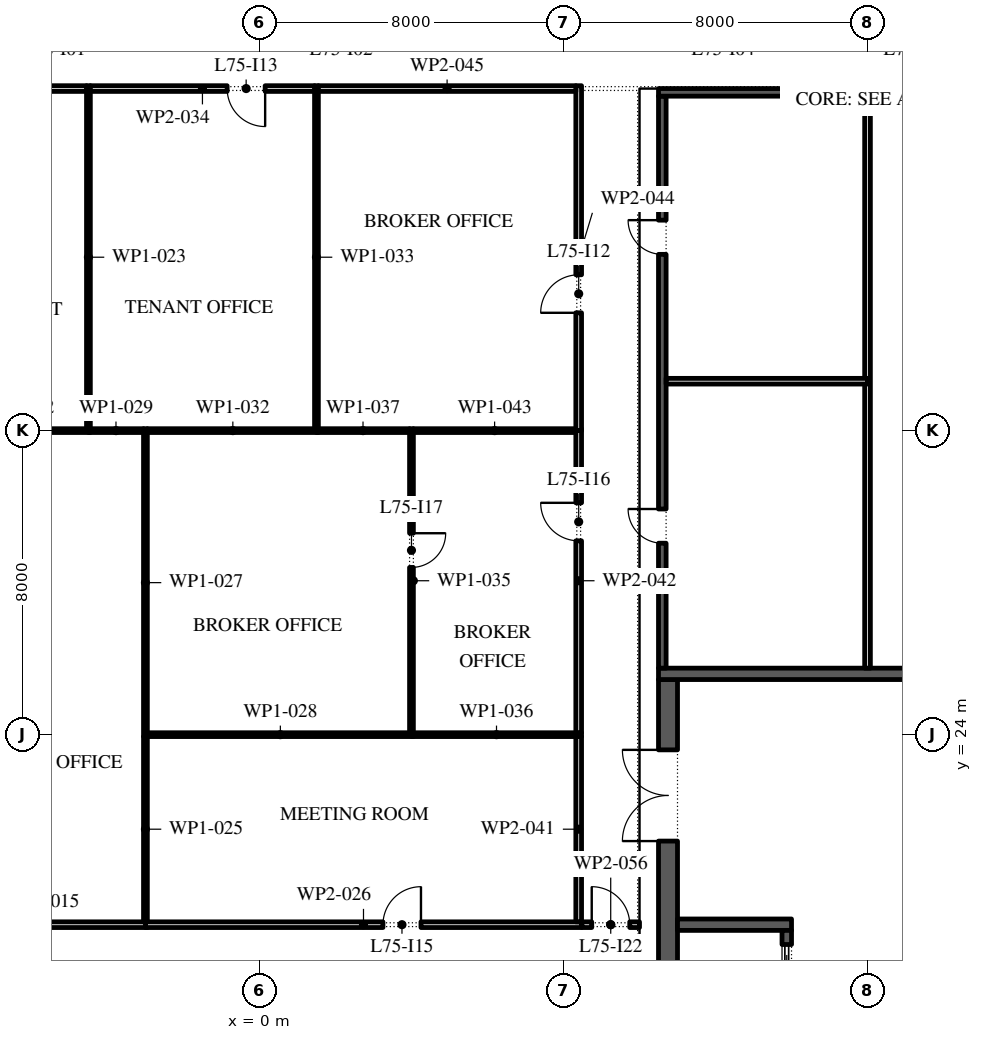
"""IFC4 building model, lengths in metres.
Left out: names, types, materials, properties, quantities, classifications, styles, units other than length and angle.
Written with IfcOpenShell. Run it as: python <this file> out.ifc"""

import sys

from ifc_helpers import new_model, si_unit, direction, frame, frame_2d, origin, place, context, subcontext, project, spatial, rectangle, extrude, element, fill, save


model = new_model("IFC4")
c1 = context("Model", 3, precision=1e-05, world=origin(), true_north=direction((0.0, 1.0)))
c2 = subcontext(c1, "Body", "Model", "MODEL_VIEW")
j1 = project(units=[si_unit("LENGTHUNIT", "METRE"), si_unit("PLANEANGLEUNIT", "RADIAN")], contexts=[c1])
p1 = place(None, origin())
s1 = spatial("IfcSite", under=j1, at=p1, CompositionType="ELEMENT")
p2 = place(p1, origin())
s2 = spatial("IfcBuilding", under=s1, at=p2, CompositionType="ELEMENT")
p3 = place(p2, frame((0.0, 0.0, 342.6)))
s3 = spatial("IfcBuildingStorey", under=s2, at=p3, CompositionType="ELEMENT", Elevation=342.6)
p4 = place(p3, frame((10.75, -2.45, 0.0), z_axis=(0.0, 0.0, 1.0), x_axis=(0.0, 1.0, 0.0)))
e1 = element("IfcWall", 1, at=p4, inside=s3, PredefinedType="SHEAR", context=c2, shape_type="SweptSolid", body=[
    extrude(rectangle(XDim=27.9, YDim=0.5, at=frame_2d((13.95, 0.0))), origin(), (0.0, 0.0, 1.0), 4.0),
])
p5 = place(p4, frame((23.65, 0.0, 0.0)))
e2 = element("IfcOpeningElement", 2, at=p5, cuts=e1, PredefinedType="OPENING", context=c2, shape_type="SweptSolid", body=[
    extrude(rectangle(XDim=2.4, YDim=2.1, at=frame_2d((1.2, 1.05))), frame((0.0, 0.26, 0.0), z_axis=(0.0, -1.0, 0.0), x_axis=(1.0, 0.0, 0.0)), (0.0, 0.0, 1.0), 0.52),
])
p6 = place(p4, frame((1.087, 0.0, 0.0)))
e3 = element("IfcOpeningElement", 3, at=p6, cuts=e1, PredefinedType="OPENING", context=c2, shape_type="SweptSolid", body=[
    extrude(rectangle(XDim=0.9, YDim=2.1, at=frame_2d((0.45, 1.05))), frame((0.0, 0.26, 0.0), z_axis=(0.0, -1.0, 0.0), x_axis=(1.0, 0.0, 0.0)), (0.0, 0.0, 1.0), 0.52),
])
p7 = place(p4, frame((4.262, 0.0, 0.0)))
e4 = element("IfcOpeningElement", 4, at=p7, cuts=e1, PredefinedType="OPENING", context=c2, shape_type="SweptSolid", body=[
    extrude(rectangle(XDim=1.0, YDim=2.1, at=frame_2d((0.5, 1.05))), frame((0.0, 0.26, 0.0), z_axis=(0.0, -1.0, 0.0), x_axis=(1.0, 0.0, 0.0)), (0.0, 0.0, 1.0), 0.52),
])
p8 = place(p3, frame((10.5, 25.6, 0.0), z_axis=(0.0, 0.0, 1.0), x_axis=(1.0, 0.0, 0.0)))
e5 = element("IfcWall", 5, at=p8, inside=s3, PredefinedType="SHEAR", context=c2, shape_type="SweptSolid", body=[
    extrude(rectangle(XDim=11.0, YDim=0.3, at=frame_2d((5.5, 0.0))), origin(), (0.0, 0.0, 1.0), 4.0),
])
p9 = place(p3, frame((11.0, 19.0, 0.0), z_axis=(0.0, 0.0, 1.0), x_axis=(1.0, 0.0, 0.0)))
e6 = element("IfcWall", 6, at=p9, inside=s3, PredefinedType="SHEAR", context=c2, shape_type="SweptSolid", body=[
    extrude(rectangle(XDim=3.0, YDim=0.3, at=frame_2d((1.5, 0.0))), origin(), (0.0, 0.0, 1.0), 4.0),
])
p10 = place(p3, frame((13.875, -2.45, 0.0), z_axis=(0.0, 0.0, 1.0), x_axis=(0.0, 1.0, 0.0)))
e7 = element("IfcWall", 7, at=p10, inside=s3, PredefinedType="SHEAR", context=c2, shape_type="SweptSolid", body=[
    extrude(rectangle(XDim=21.3, YDim=0.25, at=frame_2d((10.65, 0.0))), origin(), (0.0, 0.0, 1.0), 4.0),
])
p11 = place(p10, frame((11.357, 0.0, 0.0)))
e8 = element("IfcOpeningElement", 8, at=p11, cuts=e7, PredefinedType="OPENING", context=c2, shape_type="SweptSolid", body=[
    extrude(rectangle(XDim=0.9, YDim=2.1, at=frame_2d((0.45, 1.05))), frame((0.0, 0.135, 0.0), z_axis=(0.0, -1.0, 0.0), x_axis=(1.0, 0.0, 0.0)), (0.0, 0.0, 1.0), 0.27),
])
p12 = place(p10, frame((6.971, 0.0, 0.0)))
e9 = element("IfcOpeningElement", 9, at=p12, cuts=e7, PredefinedType="OPENING", context=c2, shape_type="SweptSolid", body=[
    extrude(rectangle(XDim=1.1, YDim=2.1, at=frame_2d((0.55, 1.05))), frame((0.0, 0.135, 0.0), z_axis=(0.0, -1.0, 0.0), x_axis=(1.0, 0.0, 0.0)), (0.0, 0.0, 1.0), 0.27),
])
p13 = place(p10, frame((15.543, 0.0, 0.0)))
e10 = element("IfcOpeningElement", 10, at=p13, cuts=e7, PredefinedType="OPENING", context=c2, shape_type="SweptSolid", body=[
    extrude(rectangle(XDim=1.1, YDim=2.1, at=frame_2d((0.55, 1.05))), frame((0.0, 0.135, 0.0), z_axis=(0.0, -1.0, 0.0), x_axis=(1.0, 0.0, 0.0)), (0.0, 0.0, 1.0), 0.27),
])
p14 = place(p10, frame((17.686, 0.0, 0.0)))
e11 = element("IfcOpeningElement", 11, at=p14, cuts=e7, PredefinedType="OPENING", context=c2, shape_type="SweptSolid", body=[
    extrude(rectangle(XDim=1.1, YDim=2.1, at=frame_2d((0.55, 1.05))), frame((0.0, 0.135, 0.0), z_axis=(0.0, -1.0, 0.0), x_axis=(1.0, 0.0, 0.0)), (0.0, 0.0, 1.0), 0.27),
])
p15 = place(p10, frame((19.829, 0.0, 0.0)))
e12 = element("IfcOpeningElement", 12, at=p15, cuts=e7, PredefinedType="OPENING", context=c2, shape_type="SweptSolid", body=[
    extrude(rectangle(XDim=1.1, YDim=2.1, at=frame_2d((0.55, 1.05))), frame((0.0, 0.135, 0.0), z_axis=(0.0, -1.0, 0.0), x_axis=(1.0, 0.0, 0.0)), (0.0, 0.0, 1.0), 0.27),
])
p16 = place(p3, frame((10.6, 25.75, 0.0), z_axis=(0.0, 0.0, 1.0), x_axis=(0.0, 1.0, 0.0)))
e13 = element("IfcWall", 13, at=p16, inside=s3, PredefinedType="SHEAR", context=c2, shape_type="SweptSolid", body=[
    extrude(rectangle(XDim=15.05, YDim=0.2, at=frame_2d((7.525, 0.0))), origin(), (0.0, 0.0, 1.0), 4.0),
])
p17 = place(p16, frame((3.288, 0.0, 0.0)))
e14 = element("IfcOpeningElement", 14, at=p17, cuts=e13, PredefinedType="OPENING", context=c2, shape_type="SweptSolid", body=[
    extrude(rectangle(XDim=0.9, YDim=2.1, at=frame_2d((0.45, 1.05))), frame((0.0, 0.11, 0.0), z_axis=(0.0, -1.0, 0.0), x_axis=(1.0, 0.0, 0.0)), (0.0, 0.0, 1.0), 0.22),
])
p18 = place(p16, frame((10.887, 0.0, 0.0)))
e15 = element("IfcOpeningElement", 15, at=p18, cuts=e13, PredefinedType="OPENING", context=c2, shape_type="SweptSolid", body=[
    extrude(rectangle(XDim=0.9, YDim=2.1, at=frame_2d((0.45, 1.05))), frame((0.0, 0.11, 0.0), z_axis=(0.0, -1.0, 0.0), x_axis=(1.0, 0.0, 0.0)), (0.0, 0.0, 1.0), 0.22),
])
p19 = place(p3, frame((10.5, 40.9, 0.0), z_axis=(0.0, 0.0, 1.0), x_axis=(1.0, 0.0, 0.0)))
e16 = element("IfcWall", 16, at=p19, inside=s3, PredefinedType="SHEAR", context=c2, shape_type="SweptSolid", body=[
    extrude(rectangle(XDim=11.0, YDim=0.2, at=frame_2d((5.5, 0.0))), origin(), (0.0, 0.0, 1.0), 4.0),
])
p20 = place(p3, frame((16.0, 25.75, 0.0), z_axis=(0.0, 0.0, 1.0), x_axis=(0.0, 1.0, 0.0)))
e17 = element("IfcWall", 17, at=p20, inside=s3, PredefinedType="PARTITIONING", context=c2, shape_type="SweptSolid", body=[
    extrude(rectangle(XDim=15.05, YDim=0.15, at=frame_2d((7.525, 0.0))), origin(), (0.0, 0.0, 1.0), 4.0),
])
p21 = place(p3, frame((10.7, 33.3, 0.0), z_axis=(0.0, 0.0, 1.0), x_axis=(1.0, 0.0, 0.0)))
e18 = element("IfcWall", 18, at=p21, inside=s3, PredefinedType="PARTITIONING", context=c2, shape_type="SweptSolid", body=[
    extrude(rectangle(XDim=5.3, YDim=0.15, at=frame_2d((2.65, 0.0))), origin(), (0.0, 0.0, 1.0), 4.0),
])
p22 = place(p3, frame((-8.475, 19.0, 0.0), z_axis=(0.0, 0.0, 1.0), x_axis=(1.0, 0.0, 0.0)))
e19 = element("IfcWall", 19, at=p22, inside=s3, PredefinedType="PARTITIONING", context=c2, shape_type="SweptSolid", body=[
    extrude(rectangle(XDim=5.525, YDim=0.15, at=frame_2d((2.763, 0.0))), origin(), (0.0, 0.0, 1.0), 4.0),
])
p23 = place(p3, frame((-4.45, 32.0, 0.0), z_axis=(0.0, 0.0, 1.0), x_axis=(-1.0, 0.0, 0.0)))
e20 = element("IfcWall", 20, at=p23, inside=s3, PredefinedType="PARTITIONING", context=c2, shape_type="SweptSolid", body=[
    extrude(rectangle(XDim=3.875, YDim=0.1, at=frame_2d((1.938, 0.0))), origin(), (0.0, 0.0, 1.0), 4.0),
])
p24 = place(p3, frame((-4.5, 32.05, 0.0), z_axis=(0.0, 0.0, 1.0), x_axis=(0.0, 1.0, 0.0)))
e21 = element("IfcWall", 21, at=p24, inside=s3, PredefinedType="PARTITIONING", context=c2, shape_type="SweptSolid", body=[
    extrude(rectangle(XDim=9.025, YDim=0.1, at=frame_2d((4.512, 0.0))), origin(), (0.0, 0.0, 1.0), 4.0),
])
p25 = place(p3, frame((-4.55, 41.0, 0.0), z_axis=(0.0, 0.0, 1.0), x_axis=(-1.0, 0.0, 0.0)))
e22 = element("IfcWall", 22, at=p25, inside=s3, PredefinedType="PARTITIONING", context=c2, shape_type="SweptSolid", body=[
    extrude(rectangle(XDim=3.775, YDim=0.15, at=frame_2d((1.887, 0.0))), origin(), (0.0, 0.0, 1.0), 4.0),
])
p26 = place(p3, frame((-3.0, 19.075, 0.0), z_axis=(0.0, 0.0, 1.0), x_axis=(0.0, 1.0, 0.0)))
e23 = element("IfcWall", 23, at=p26, inside=s3, PredefinedType="PARTITIONING", context=c2, shape_type="SweptSolid", body=[
    extrude(rectangle(XDim=4.875, YDim=0.1, at=frame_2d((2.438, 0.0))), origin(), (0.0, 0.0, 1.0), 4.0),
])
p27 = place(p3, frame((-3.0, 19.0, 0.0), z_axis=(0.0, 0.0, 1.0), x_axis=(1.0, 0.0, 0.0)))
e24 = element("IfcWall", 24, at=p27, inside=s3, PredefinedType="PARTITIONING", context=c2, shape_type="SweptSolid", body=[
    extrude(rectangle(XDim=11.475, YDim=0.15, at=frame_2d((5.738, 0.0))), origin(), (0.0, 0.0, 1.0), 4.0),
])
p28 = place(p27, frame((6.25, 0.0, 0.0)))
e25 = element("IfcOpeningElement", 25, at=p28, cuts=e24, PredefinedType="OPENING", context=c2, shape_type="SweptSolid", body=[
    extrude(rectangle(XDim=1.0, YDim=2.1, at=frame_2d((0.5, 1.05))), frame((0.0, 0.085, 0.0), z_axis=(0.0, -1.0, 0.0), x_axis=(1.0, 0.0, 0.0)), (0.0, 0.0, 1.0), 0.17),
])
p29 = place(p3, frame((-3.0, 23.95, 0.0), z_axis=(0.0, 0.0, 1.0), x_axis=(0.0, 1.0, 0.0)))
e26 = element("IfcWall", 26, at=p29, inside=s3, PredefinedType="PARTITIONING", context=c2, shape_type="SweptSolid", body=[
    extrude(rectangle(XDim=8.1, YDim=0.1, at=frame_2d((4.05, 0.0))), origin(), (0.0, 0.0, 1.0), 4.0),
])
p30 = place(p3, frame((-2.95, 24.0, 0.0), z_axis=(0.0, 0.0, 1.0), x_axis=(1.0, 0.0, 0.0)))
e27 = element("IfcWall", 27, at=p30, inside=s3, PredefinedType="PARTITIONING", context=c2, shape_type="SweptSolid", body=[
    extrude(rectangle(XDim=7.0, YDim=0.1, at=frame_2d((3.5, 0.0))), origin(), (0.0, 0.0, 1.0), 4.0),
])
p31 = place(p3, frame((-3.05, 32.0, 0.0), z_axis=(0.0, 0.0, 1.0), x_axis=(-1.0, 0.0, 0.0)))
e28 = element("IfcWall", 28, at=p31, inside=s3, PredefinedType="PARTITIONING", context=c2, shape_type="SweptSolid", body=[
    extrude(rectangle(XDim=1.45, YDim=0.1, at=frame_2d((0.725, 0.0))), origin(), (0.0, 0.0, 1.0), 4.0),
])
p32 = place(p3, frame((1.55, 32.0, 0.0), z_axis=(0.0, 0.0, 1.0), x_axis=(-1.0, 0.0, 0.0)))
e29 = element("IfcWall", 29, at=p32, inside=s3, PredefinedType="PARTITIONING", context=c2, shape_type="SweptSolid", body=[
    extrude(rectangle(XDim=4.5, YDim=0.1, at=frame_2d((2.25, 0.0))), origin(), (0.0, 0.0, 1.0), 4.0),
])
p33 = place(p3, frame((1.5, 32.05, 0.0), z_axis=(0.0, 0.0, 1.0), x_axis=(0.0, 1.0, 0.0)))
e30 = element("IfcWall", 30, at=p33, inside=s3, PredefinedType="PARTITIONING", context=c2, shape_type="SweptSolid", body=[
    extrude(rectangle(XDim=9.025, YDim=0.1, at=frame_2d((4.512, 0.0))), origin(), (0.0, 0.0, 1.0), 4.0),
])
p34 = place(p3, frame((1.45, 41.0, 0.0), z_axis=(0.0, 0.0, 1.0), x_axis=(-1.0, 0.0, 0.0)))
e31 = element("IfcWall", 31, at=p34, inside=s3, PredefinedType="PARTITIONING", context=c2, shape_type="SweptSolid", body=[
    extrude(rectangle(XDim=5.9, YDim=0.15, at=frame_2d((2.95, 0.0))), origin(), (0.0, 0.0, 1.0), 4.0),
])
p35 = place(p34, frame((1.3, 0.0, 0.0)))
e32 = element("IfcOpeningElement", 32, at=p35, cuts=e31, PredefinedType="OPENING", context=c2, shape_type="SweptSolid", body=[
    extrude(rectangle(XDim=1.0, YDim=2.1, at=frame_2d((0.5, 1.05))), frame((0.0, 0.085, 0.0), z_axis=(0.0, -1.0, 0.0), x_axis=(1.0, 0.0, 0.0)), (0.0, 0.0, 1.0), 0.17),
])
p36 = place(p3, frame((4.0, 24.05, 0.0), z_axis=(0.0, 0.0, 1.0), x_axis=(0.0, 1.0, 0.0)))
e33 = element("IfcWall", 33, at=p36, inside=s3, PredefinedType="PARTITIONING", context=c2, shape_type="SweptSolid", body=[
    extrude(rectangle(XDim=8.0, YDim=0.1, at=frame_2d((4.0, 0.0))), origin(), (0.0, 0.0, 1.0), 4.0),
])
p37 = place(p36, frame((4.35, 0.0, 0.0)))
e34 = element("IfcOpeningElement", 34, at=p37, cuts=e33, PredefinedType="OPENING", context=c2, shape_type="SweptSolid", body=[
    extrude(rectangle(XDim=0.9, YDim=2.1, at=frame_2d((0.45, 1.05))), frame((0.0, 0.06, 0.0), z_axis=(0.0, -1.0, 0.0), x_axis=(1.0, 0.0, 0.0)), (0.0, 0.0, 1.0), 0.12),
])
p38 = place(p3, frame((4.0, 24.0, 0.0), z_axis=(0.0, 0.0, 1.0), x_axis=(1.0, 0.0, 0.0)))
e35 = element("IfcWall", 35, at=p38, inside=s3, PredefinedType="PARTITIONING", context=c2, shape_type="SweptSolid", body=[
    extrude(rectangle(XDim=4.475, YDim=0.1, at=frame_2d((2.238, 0.0))), origin(), (0.0, 0.0, 1.0), 4.0),
])
p39 = place(p3, frame((3.95, 32.0, 0.0), z_axis=(0.0, 0.0, 1.0), x_axis=(-1.0, 0.0, 0.0)))
e36 = element("IfcWall", 36, at=p39, inside=s3, PredefinedType="PARTITIONING", context=c2, shape_type="SweptSolid", body=[
    extrude(rectangle(XDim=2.45, YDim=0.1, at=frame_2d((1.225, 0.0))), origin(), (0.0, 0.0, 1.0), 4.0),
])
p40 = place(p3, frame((8.4, 19.075, 0.0), z_axis=(0.0, 0.0, 1.0), x_axis=(0.0, 1.0, 0.0)))
e37 = element("IfcWall", 37, at=p40, inside=s3, PredefinedType="PARTITIONING", context=c2, shape_type="SweptSolid", body=[
    extrude(rectangle(XDim=4.875, YDim=0.15, at=frame_2d((2.438, 0.0))), origin(), (0.0, 0.0, 1.0), 4.0),
])
p41 = place(p3, frame((8.4, 24.05, 0.0), z_axis=(0.0, 0.0, 1.0), x_axis=(0.0, 1.0, 0.0)))
e38 = element("IfcWall", 38, at=p41, inside=s3, PredefinedType="PARTITIONING", context=c2, shape_type="SweptSolid", body=[
    extrude(rectangle(XDim=8.0, YDim=0.15, at=frame_2d((4.0, 0.0))), origin(), (0.0, 0.0, 1.0), 4.0),
])
p42 = place(p41, frame((5.05, 0.0, 0.0)))
e39 = element("IfcOpeningElement", 39, at=p42, cuts=e38, PredefinedType="OPENING", context=c2, shape_type="SweptSolid", body=[
    extrude(rectangle(XDim=1.0, YDim=2.1, at=frame_2d((0.5, 1.05))), frame((0.0, 0.085, 0.0), z_axis=(0.0, -1.0, 0.0), x_axis=(1.0, 0.0, 0.0)), (0.0, 0.0, 1.0), 0.17),
])
p43 = place(p3, frame((8.325, 32.0, 0.0), z_axis=(0.0, 0.0, 1.0), x_axis=(-1.0, 0.0, 0.0)))
e40 = element("IfcWall", 40, at=p43, inside=s3, PredefinedType="PARTITIONING", context=c2, shape_type="SweptSolid", body=[
    extrude(rectangle(XDim=4.275, YDim=0.1, at=frame_2d((2.137, 0.0))), origin(), (0.0, 0.0, 1.0), 4.0),
])
p44 = place(p3, frame((8.4, 32.0, 0.0), z_axis=(0.0, 0.0, 1.0), x_axis=(0.0, 1.0, 0.0)))
e41 = element("IfcWall", 41, at=p44, inside=s3, PredefinedType="PARTITIONING", context=c2, shape_type="SweptSolid", body=[
    extrude(rectangle(XDim=9.075, YDim=0.15, at=frame_2d((4.538, 0.0))), origin(), (0.0, 0.0, 1.0), 4.0),
])
p45 = place(p44, frame((3.1, 0.0, 0.0)))
e42 = element("IfcOpeningElement", 42, at=p45, cuts=e41, PredefinedType="OPENING", context=c2, shape_type="SweptSolid", body=[
    extrude(rectangle(XDim=1.0, YDim=2.1, at=frame_2d((0.5, 1.05))), frame((0.0, 0.085, 0.0), z_axis=(0.0, -1.0, 0.0), x_axis=(1.0, 0.0, 0.0)), (0.0, 0.0, 1.0), 0.17),
])
p46 = place(p3, frame((8.325, 41.0, 0.0), z_axis=(0.0, 0.0, 1.0), x_axis=(-1.0, 0.0, 0.0)))
e43 = element("IfcWall", 43, at=p46, inside=s3, PredefinedType="PARTITIONING", context=c2, shape_type="SweptSolid", body=[
    extrude(rectangle(XDim=6.775, YDim=0.15, at=frame_2d((3.387, 0.0))), origin(), (0.0, 0.0, 1.0), 4.0),
])
p47 = place(p3, frame((8.485, 19.0, 0.0), z_axis=(0.0, 0.0, 1.0), x_axis=(1.0, 0.0, 0.0)))
e44 = element("IfcWall", 44, at=p47, inside=s3, PredefinedType="PARTITIONING", context=c2, shape_type="SweptSolid", body=[
    extrude(rectangle(XDim=1.515, YDim=0.15, at=frame_2d((0.757, 0.0))), origin(), (0.0, 0.0, 1.0), 4.0),
])
p48 = place(p47, frame((0.258, 0.0, 0.0)))
e45 = element("IfcOpeningElement", 45, at=p48, cuts=e44, PredefinedType="OPENING", context=c2, shape_type="SweptSolid", body=[
    extrude(rectangle(XDim=1.0, YDim=2.1, at=frame_2d((0.5, 1.05))), frame((0.0, 0.085, 0.0), z_axis=(0.0, -1.0, 0.0), x_axis=(1.0, 0.0, 0.0)), (0.0, 0.0, 1.0), 0.17),
])
p49 = place(p15, origin())
e46 = element("IfcDoor", 46, at=p49, inside=s3, OperationType="SLIDING_TO_LEFT", PredefinedType="DOOR", context=c2, shape_type="SweptSolid", body=[
    extrude(rectangle(XDim=1.1, YDim=2.1, at=frame_2d((0.55, 1.05))), frame((0.0, 0.025, 0.0), z_axis=(0.0, -1.0, 0.0), x_axis=(1.0, 0.0, 0.0)), (0.0, 0.0, 1.0), 0.05),
])
fill(e12, e46)
p50 = place(p5, origin())
e47 = element("IfcDoor", 47, at=p50, inside=s3, OperationType="DOUBLE_DOOR_SINGLE_SWING", PredefinedType="DOOR", context=c2, shape_type="SweptSolid", body=[
    extrude(rectangle(XDim=2.4, YDim=2.1, at=frame_2d((1.2, 1.05))), frame((0.0, 0.025, 0.0), z_axis=(0.0, -1.0, 0.0), x_axis=(1.0, 0.0, 0.0)), (0.0, 0.0, 1.0), 0.05),
])
fill(e2, e47)
p51 = place(p17, origin())
e48 = element("IfcDoor", 48, at=p51, inside=s3, OperationType="SINGLE_SWING_LEFT", PredefinedType="DOOR", context=c2, shape_type="SweptSolid", body=[
    extrude(rectangle(XDim=0.9, YDim=2.1, at=frame_2d((0.45, 1.05))), frame((0.0, -0.05, 0.0), z_axis=(0.0, -1.0, 0.0), x_axis=(1.0, 0.0, 0.0)), (0.0, 0.0, 1.0), 0.05),
])
fill(e14, e48)
p52 = place(p18, origin())
e49 = element("IfcDoor", 49, at=p52, inside=s3, OperationType="SINGLE_SWING_LEFT", PredefinedType="DOOR", context=c2, shape_type="SweptSolid", body=[
    extrude(rectangle(XDim=0.9, YDim=2.1, at=frame_2d((0.45, 1.05))), frame((0.0, -0.05, 0.0), z_axis=(0.0, -1.0, 0.0), x_axis=(1.0, 0.0, 0.0)), (0.0, 0.0, 1.0), 0.05),
])
fill(e15, e49)
p53 = place(p45, origin())
e50 = element("IfcDoor", 50, at=p53, inside=s3, OperationType="SINGLE_SWING_RIGHT", PredefinedType="DOOR", context=c2, shape_type="SweptSolid", body=[
    extrude(rectangle(XDim=1.0, YDim=2.1, at=frame_2d((0.5, 1.05))), frame((0.0, 0.025, 0.0), z_axis=(0.0, -1.0, 0.0), x_axis=(1.0, 0.0, 0.0)), (0.0, 0.0, 1.0), 0.05),
])
fill(e42, e50)
p54 = place(p35, origin())
e51 = element("IfcDoor", 51, at=p54, inside=s3, OperationType="SINGLE_SWING_RIGHT", PredefinedType="DOOR", context=c2, shape_type="SweptSolid", body=[
    extrude(rectangle(XDim=1.0, YDim=2.1, at=frame_2d((0.5, 1.05))), frame((0.0, 0.025, 0.0), z_axis=(0.0, -1.0, 0.0), x_axis=(1.0, 0.0, 0.0)), (0.0, 0.0, 1.0), 0.05),
])
fill(e32, e51)
p55 = place(p28, origin())
e52 = element("IfcDoor", 52, at=p55, inside=s3, OperationType="SINGLE_SWING_LEFT", PredefinedType="DOOR", context=c2, shape_type="SweptSolid", body=[
    extrude(rectangle(XDim=1.0, YDim=2.1, at=frame_2d((0.5, 1.05))), frame((0.0, 0.025, 0.0), z_axis=(0.0, -1.0, 0.0), x_axis=(1.0, 0.0, 0.0)), (0.0, 0.0, 1.0), 0.05),
])
fill(e25, e52)
p56 = place(p42, origin())
e53 = element("IfcDoor", 53, at=p56, inside=s3, OperationType="SINGLE_SWING_LEFT", PredefinedType="DOOR", context=c2, shape_type="SweptSolid", body=[
    extrude(rectangle(XDim=1.0, YDim=2.1, at=frame_2d((0.5, 1.05))), frame((0.0, 0.025, 0.0), z_axis=(0.0, -1.0, 0.0), x_axis=(1.0, 0.0, 0.0)), (0.0, 0.0, 1.0), 0.05),
])
fill(e39, e53)
p57 = place(p37, frame((0.9, 0.0, 0.0), z_axis=(0.0, 0.0, 1.0), x_axis=(-1.0, 0.0, 0.0)))
e54 = element("IfcDoor", 54, at=p57, inside=s3, OperationType="SINGLE_SWING_RIGHT", PredefinedType="DOOR", context=c2, shape_type="SweptSolid", body=[
    extrude(rectangle(XDim=0.9, YDim=2.1, at=frame_2d((0.45, 1.05))), frame((0.0, 0.025, 0.0), z_axis=(0.0, -1.0, 0.0), x_axis=(1.0, 0.0, 0.0)), (0.0, 0.0, 1.0), 0.05),
])
fill(e34, e54)
p58 = place(p48, origin())
e55 = element("IfcDoor", 55, at=p58, inside=s3, OperationType="SINGLE_SWING_RIGHT", PredefinedType="DOOR", context=c2, shape_type="SweptSolid", body=[
    extrude(rectangle(XDim=1.0, YDim=2.1, at=frame_2d((0.5, 1.05))), frame((0.0, 0.025, 0.0), z_axis=(0.0, -1.0, 0.0), x_axis=(1.0, 0.0, 0.0)), (0.0, 0.0, 1.0), 0.05),
])
fill(e45, e55)
save(model, sys.argv[1])
